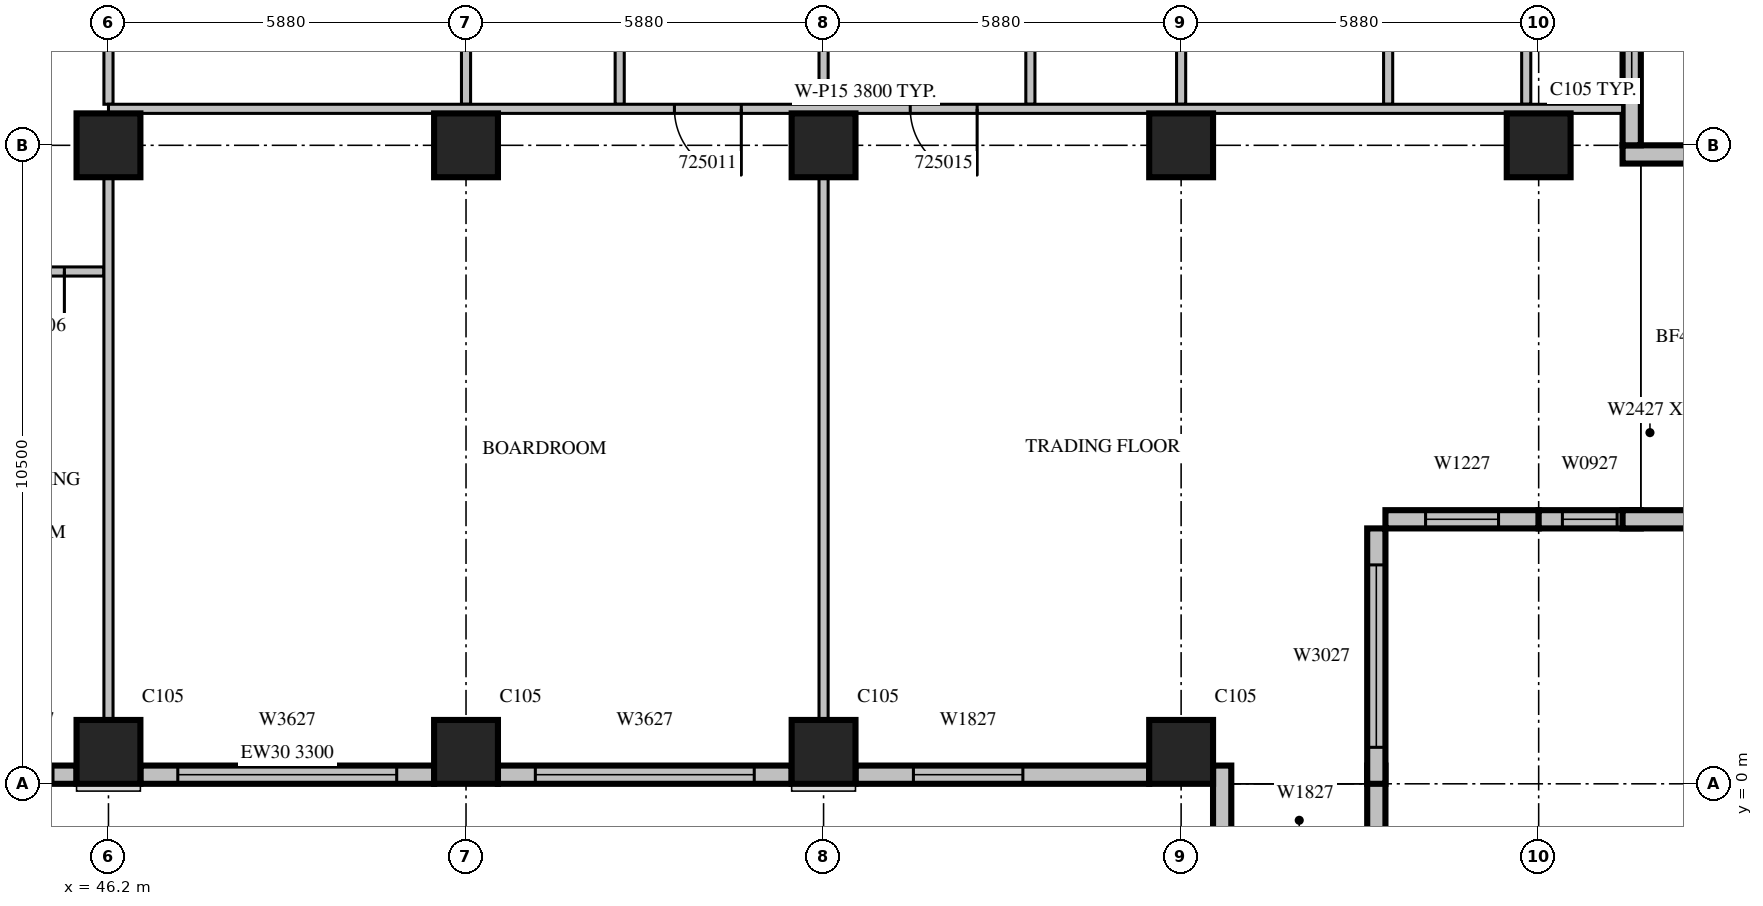
"""IFC4 building model, lengths in metres.
Left out: names, types, materials, properties, quantities, classifications, styles, units other than length and angle.
Written with IfcOpenShell. Run it as: python <this file> out.ifc"""

import sys

from ifc_helpers import new_model, si_unit, direction, frame, frame_2d, origin, origin_2d, place, context, subcontext, project, spatial, rectangle, extrude, source, transform, mapped, element, fill, save


model = new_model("IFC4")
c1 = context("Model", 3, precision=1e-05, world=origin(), true_north=direction((0.0, 1.0)))
c2 = subcontext(c1, "Body", "Model", "MODEL_VIEW")
j1 = project(units=[si_unit("LENGTHUNIT", "METRE"), si_unit("PLANEANGLEUNIT", "RADIAN")], contexts=[c1])
p1 = place(None, origin())
s1 = spatial("IfcSite", under=j1, at=p1, CompositionType="ELEMENT")
p2 = place(p1, origin())
s2 = spatial("IfcBuilding", under=s1, at=p2, CompositionType="ELEMENT")
p3 = place(p2, frame((0.0, 0.0, 116.1)))
s3 = spatial("IfcBuildingStorey", under=s2, at=p3, CompositionType="ELEMENT", Elevation=116.1)
m1 = source(origin(), c2, "Body", "SweptSolid", [
    extrude(rectangle(XDim=1.05, YDim=1.05, at=origin_2d()), origin(), (0.0, 0.0, 1.0), 4.2),
])
for number, where, z_axis, x_axis in (
    (1, (46.2, 0.525, 0.0), (0.0, 0.0, 1.0), (1.0, 0.0, 0.0)),
    (2, (52.08, 0.525, 0.0), (0.0, 0.0, 1.0), (1.0, 0.0, 0.0)),
    (3, (57.96, 0.525, 0.0), (0.0, 0.0, 1.0), (1.0, 0.0, 0.0)),
    (4, (63.84, 0.525, 0.0), (0.0, 0.0, 1.0), (1.0, 0.0, 0.0)),
    (5, (46.2, 10.5, 0.0), (0.0, 0.0, 1.0), (1.0, 0.0, 0.0)),
    (6, (52.08, 10.5, 0.0), (0.0, 0.0, 1.0), (1.0, 0.0, 0.0)),
    (7, (57.96, 10.5, 0.0), (0.0, 0.0, 1.0), (1.0, 0.0, 0.0)),
    (8, (63.84, 10.5, 0.0), (0.0, 0.0, 1.0), (1.0, 0.0, 0.0)),
    (9, (69.72, 10.5, 0.0), (0.0, 0.0, 1.0), (1.0, 0.0, 0.0)),
):
    element("IfcColumn", number, at=place(p3, frame(where, z_axis=z_axis, x_axis=x_axis)), inside=s3, PredefinedType="COLUMN", context=c2, shape_type="MappedRepresentation", body=[
        mapped(m1, transform((0.0, 0.0, 0.0), scale=1.0)),
    ])
m2 = source(origin(), c2, "Body", "SweptSolid", [
    extrude(rectangle(XDim=1.675, YDim=0.3, at=frame_2d((0.838, 0.0))), origin(), (0.0, 0.0, 1.0), 3.8),
])
p4 = place(p3, frame((44.0, 0.15, 0.0), z_axis=(0.0, 0.0, 1.0), x_axis=(1.0, 0.0, 0.0)))
e10 = element("IfcWall", 10, at=p4, inside=s3, PredefinedType="STANDARD", context=c2, shape_type="MappedRepresentation", body=[
    mapped(m2, transform((0.0, 0.0, 0.0), scale=1.0)),
])
m3 = source(origin(), c2, "Body", "SweptSolid", [
    extrude(rectangle(XDim=0.9, YDim=2.7, at=frame_2d((0.45, 1.35))), frame((0.0, 0.16, 0.0), z_axis=(0.0, -1.0, 0.0), x_axis=(1.0, 0.0, 0.0)), (0.0, 0.0, 1.0), 0.32),
])
p5 = place(p4, frame((0.388, 0.0, 0.6)))
e11 = element("IfcOpeningElement", 11, at=p5, cuts=e10, PredefinedType="OPENING", context=c2, shape_type="MappedRepresentation", body=[
    mapped(m3, transform((0.0, 0.0, 0.0), scale=1.0)),
])
m4 = source(origin(), c2, "Body", "SweptSolid", [
    extrude(rectangle(XDim=4.83, YDim=0.3, at=frame_2d((2.415, 0.0))), origin(), (0.0, 0.0, 1.0), 3.3),
])
p6 = place(p3, frame((46.725, 0.15, 0.0), z_axis=(0.0, 0.0, 1.0), x_axis=(1.0, 0.0, 0.0)))
e12 = element("IfcWall", 12, at=p6, inside=s3, PredefinedType="STANDARD", context=c2, shape_type="MappedRepresentation", body=[
    mapped(m4, transform((0.0, 0.0, 0.0), scale=1.0)),
])
m5 = source(origin(), c2, "Body", "SweptSolid", [
    extrude(rectangle(XDim=3.6, YDim=2.7, at=frame_2d((1.8, 1.35))), frame((0.0, 0.16, 0.0), z_axis=(0.0, -1.0, 0.0), x_axis=(1.0, 0.0, 0.0)), (0.0, 0.0, 1.0), 0.32),
])
p7 = place(p6, frame((0.615, 0.0, 0.6)))
e13 = element("IfcOpeningElement", 13, at=p7, cuts=e12, PredefinedType="OPENING", context=c2, shape_type="MappedRepresentation", body=[
    mapped(m5, transform((0.0, 0.0, 0.0), scale=1.0)),
])
m6 = source(origin(), c2, "Body", "SweptSolid", [
    extrude(rectangle(XDim=4.83, YDim=0.3, at=frame_2d((2.415, 0.0))), origin(), (0.0, 0.0, 1.0), 3.8),
])
p8 = place(p3, frame((52.605, 0.15, 0.0), z_axis=(0.0, 0.0, 1.0), x_axis=(1.0, 0.0, 0.0)))
e14 = element("IfcWall", 14, at=p8, inside=s3, PredefinedType="STANDARD", context=c2, shape_type="MappedRepresentation", body=[
    mapped(m6, transform((0.0, 0.0, 0.0), scale=1.0)),
])
p9 = place(p8, frame((0.615, 0.0, 0.6)))
e15 = element("IfcOpeningElement", 15, at=p9, cuts=e14, PredefinedType="OPENING", context=c2, shape_type="MappedRepresentation", body=[
    mapped(m5, transform((0.0, 0.0, 0.0), scale=1.0)),
])
p10 = place(p3, frame((58.485, 0.15, 0.0), z_axis=(0.0, 0.0, 1.0), x_axis=(1.0, 0.0, 0.0)))
e16 = element("IfcWall", 16, at=p10, inside=s3, PredefinedType="STANDARD", context=c2, shape_type="MappedRepresentation", body=[
    mapped(m6, transform((0.0, 0.0, 0.0), scale=1.0)),
])
m7 = source(origin(), c2, "Body", "SweptSolid", [
    extrude(rectangle(XDim=1.8, YDim=2.7, at=frame_2d((0.9, 1.35))), frame((0.0, 0.16, 0.0), z_axis=(0.0, -1.0, 0.0), x_axis=(1.0, 0.0, 0.0)), (0.0, 0.0, 1.0), 0.32),
])
p11 = place(p10, frame((0.953, 0.0, 0.6)))
e17 = element("IfcOpeningElement", 17, at=p11, cuts=e16, PredefinedType="OPENING", context=c2, shape_type="MappedRepresentation", body=[
    mapped(m7, transform((0.0, 0.0, 0.0), scale=1.0)),
])
m8 = source(origin(), c2, "Body", "SweptSolid", [
    extrude(rectangle(XDim=1.2, YDim=0.3, at=frame_2d((0.6, 0.0))), origin(), (0.0, 0.0, 1.0), 3.8),
])
for number, where, z_axis, x_axis in (
    (18, (64.515, 0.3, 0.0), (0.0, 0.0, 1.0), (0.0, -1.0, 0.0)),
    (19, (67.05, 0.3, 0.0), (0.0, 0.0, 1.0), (0.0, -1.0, 0.0)),
):
    element("IfcWall", number, at=place(p3, frame(where, z_axis=z_axis, x_axis=x_axis)), inside=s3, PredefinedType="STANDARD", context=c2, shape_type="MappedRepresentation", body=[
        mapped(m8, transform((0.0, 0.0, 0.0), scale=1.0)),
    ])
m9 = source(origin(), c2, "Body", "SweptSolid", [
    extrude(rectangle(XDim=4.2, YDim=0.3, at=frame_2d((2.1, 0.0))), origin(), (0.0, 0.0, 1.0), 3.8),
])
p12 = place(p3, frame((67.05, 0.0, 0.0), z_axis=(0.0, 0.0, 1.0), x_axis=(0.0, 1.0, 0.0)))
e20 = element("IfcWall", 20, at=p12, inside=s3, PredefinedType="STANDARD", context=c2, shape_type="MappedRepresentation", body=[
    mapped(m9, transform((0.0, 0.0, 0.0), scale=1.0)),
])
m10 = source(origin(), c2, "Body", "SweptSolid", [
    extrude(rectangle(XDim=3.0, YDim=2.7, at=frame_2d((1.5, 1.35))), frame((0.0, 0.16, 0.0), z_axis=(0.0, -1.0, 0.0), x_axis=(1.0, 0.0, 0.0)), (0.0, 0.0, 1.0), 0.32),
])
p13 = place(p12, frame((0.6, 0.0, 0.6)))
e21 = element("IfcOpeningElement", 21, at=p13, cuts=e20, PredefinedType="OPENING", context=c2, shape_type="MappedRepresentation", body=[
    mapped(m10, transform((0.0, 0.0, 0.0), scale=1.0)),
])
m11 = source(origin(), c2, "Body", "SweptSolid", [
    extrude(rectangle(XDim=2.52, YDim=0.3, at=frame_2d((1.26, 0.0))), origin(), (0.0, 0.0, 1.0), 3.8),
])
p14 = place(p3, frame((67.2, 4.35, 0.0), z_axis=(0.0, 0.0, 1.0), x_axis=(1.0, 0.0, 0.0)))
e22 = element("IfcWall", 22, at=p14, inside=s3, PredefinedType="STANDARD", context=c2, shape_type="MappedRepresentation", body=[
    mapped(m11, transform((0.0, 0.0, 0.0), scale=1.0)),
])
m12 = source(origin(), c2, "Body", "SweptSolid", [
    extrude(rectangle(XDim=1.2, YDim=2.7, at=frame_2d((0.6, 1.35))), frame((0.0, 0.16, 0.0), z_axis=(0.0, -1.0, 0.0), x_axis=(1.0, 0.0, 0.0)), (0.0, 0.0, 1.0), 0.32),
])
p15 = place(p14, frame((0.66, 0.0, 0.6)))
e23 = element("IfcOpeningElement", 23, at=p15, cuts=e22, PredefinedType="OPENING", context=c2, shape_type="MappedRepresentation", body=[
    mapped(m12, transform((0.0, 0.0, 0.0), scale=1.0)),
])
m13 = source(origin(), c2, "Body", "SweptSolid", [
    extrude(rectangle(XDim=1.68, YDim=0.3, at=frame_2d((0.84, 0.0))), origin(), (0.0, 0.0, 1.0), 3.8),
])
p16 = place(p3, frame((69.72, 4.35, 0.0), z_axis=(0.0, 0.0, 1.0), x_axis=(1.0, 0.0, 0.0)))
e24 = element("IfcWall", 24, at=p16, inside=s3, PredefinedType="STANDARD", context=c2, shape_type="MappedRepresentation", body=[
    mapped(m13, transform((0.0, 0.0, 0.0), scale=1.0)),
])
p17 = place(p16, frame((0.39, 0.0, 0.6)))
e25 = element("IfcOpeningElement", 25, at=p17, cuts=e24, PredefinedType="OPENING", context=c2, shape_type="MappedRepresentation", body=[
    mapped(m3, transform((0.0, 0.0, 0.0), scale=1.0)),
])
for number, where, z_axis, x_axis in (
    (26, (71.1, 4.35, 0.0), (0.0, 0.0, 1.0), (1.0, 0.0, 0.0)),
    (27, (71.1, 10.35, 0.0), (0.0, 0.0, 1.0), (1.0, 0.0, 0.0)),
):
    element("IfcWall", number, at=place(p3, frame(where, z_axis=z_axis, x_axis=x_axis)), inside=s3, PredefinedType="STANDARD", context=c2, shape_type="MappedRepresentation", body=[
        mapped(m8, transform((0.0, 0.0, 0.0), scale=1.0)),
    ])
m14 = source(origin(), c2, "Body", "SweptSolid", [
    extrude(rectangle(XDim=6.3, YDim=0.3, at=frame_2d((3.15, 0.0))), origin(), (0.0, 0.0, 1.0), 3.8),
])
p18 = place(p3, frame((71.25, 10.5, 0.0), z_axis=(0.0, 0.0, 1.0), x_axis=(0.0, 1.0, 0.0)))
e28 = element("IfcWall", 28, at=p18, inside=s3, PredefinedType="STANDARD", context=c2, shape_type="MappedRepresentation", body=[
    mapped(m14, transform((0.0, 0.0, 0.0), scale=1.0)),
])
p19 = place(p18, frame((1.025, 0.0, 0.6)))
e29 = element("IfcOpeningElement", 29, at=p19, cuts=e28, PredefinedType="OPENING", context=c2, shape_type="MappedRepresentation", body=[
    mapped(m12, transform((0.0, 0.0, 0.0), scale=1.0)),
])
m15 = source(origin(), c2, "Body", "SweptSolid", [
    extrude(rectangle(XDim=2.2, YDim=0.15, at=frame_2d((1.1, 0.0))), origin(), (0.0, 0.0, 1.0), 3.8),
])
p20 = place(p3, frame((46.125, 8.425, 0.0), z_axis=(0.0, 0.0, 1.0), x_axis=(-1.0, 0.0, 0.0)))
e30 = element("IfcWall", 30, at=p20, inside=s3, PredefinedType="PARTITIONING", context=c2, shape_type="MappedRepresentation", body=[
    mapped(m15, transform((0.0, 0.0, 0.0), scale=1.0)),
])
m16 = source(origin(), c2, "Body", "SweptSolid", [
    extrude(rectangle(XDim=0.9, YDim=2.1, at=frame_2d((0.45, 1.05))), frame((0.0, 0.085, 0.0), z_axis=(0.0, -1.0, 0.0), x_axis=(1.0, 0.0, 0.0)), (0.0, 0.0, 1.0), 0.17),
])
p21 = place(p20, frame((0.65, 0.0, 0.0)))
e31 = element("IfcOpeningElement", 31, at=p21, cuts=e30, PredefinedType="OPENING", context=c2, shape_type="MappedRepresentation", body=[
    mapped(m16, transform((0.0, 0.0, 0.0), scale=1.0)),
])
m17 = source(origin(), c2, "Body", "SweptSolid", [
    extrude(rectangle(XDim=3.825, YDim=0.15, at=frame_2d((1.913, 0.0))), origin(), (0.0, 0.0, 1.0), 3.8),
])
for number, where, z_axis, x_axis in (
    (32, (52.08, 11.175, 0.0), (0.0, 0.0, 1.0), (0.0, 1.0, 0.0)),
    (33, (54.607, 11.175, 0.0), (0.0, 0.0, 1.0), (0.0, 1.0, 0.0)),
    (34, (61.361, 11.175, 0.0), (0.0, 0.0, 1.0), (0.0, 1.0, 0.0)),
    (35, (63.84, 11.175, 0.0), (0.0, 0.0, 1.0), (0.0, 1.0, 0.0)),
    (36, (67.244, 11.175, 0.0), (0.0, 0.0, 1.0), (0.0, 1.0, 0.0)),
    (37, (69.515, 11.175, 0.0), (0.0, 0.0, 1.0), (0.0, 1.0, 0.0)),
):
    element("IfcWall", number, at=place(p3, frame(where, z_axis=z_axis, x_axis=x_axis)), inside=s3, PredefinedType="PARTITIONING", context=c2, shape_type="MappedRepresentation", body=[
        mapped(m17, transform((0.0, 0.0, 0.0), scale=1.0)),
    ])
m18 = source(origin(), c2, "Body", "SweptSolid", [
    extrude(rectangle(XDim=8.927, YDim=0.15, at=frame_2d((4.463, 0.0))), origin(), (0.0, 0.0, 1.0), 3.8),
])
p22 = place(p3, frame((46.2, 1.049, 0.0), z_axis=(0.0, 0.0, 1.0), x_axis=(0.0, 1.0, 0.0)))
e38 = element("IfcWall", 38, at=p22, inside=s3, PredefinedType="PARTITIONING", context=c2, shape_type="MappedRepresentation", body=[
    mapped(m18, transform((0.0, 0.0, 0.0), scale=1.0)),
])
p23 = place(p3, frame((46.2, 11.175, 0.0), z_axis=(0.0, 0.0, 1.0), x_axis=(0.0, 1.0, 0.0)))
e39 = element("IfcWall", 39, at=p23, inside=s3, PredefinedType="PARTITIONING", context=c2, shape_type="MappedRepresentation", body=[
    mapped(m17, transform((0.0, 0.0, 0.0), scale=1.0)),
])
p24 = place(p3, frame((57.96, 1.049, 0.0), z_axis=(0.0, 0.0, 1.0), x_axis=(0.0, 1.0, 0.0)))
e40 = element("IfcWall", 40, at=p24, inside=s3, PredefinedType="PARTITIONING", context=c2, shape_type="MappedRepresentation", body=[
    mapped(m18, transform((0.0, 0.0, 0.0), scale=1.0)),
])
p25 = place(p3, frame((57.96, 11.175, 0.0), z_axis=(0.0, 0.0, 1.0), x_axis=(0.0, 1.0, 0.0)))
e41 = element("IfcWall", 41, at=p25, inside=s3, PredefinedType="PARTITIONING", context=c2, shape_type="MappedRepresentation", body=[
    mapped(m17, transform((0.0, 0.0, 0.0), scale=1.0)),
])
m19 = source(origin(), c2, "Body", "SweptSolid", [
    extrude(rectangle(XDim=24.9, YDim=0.15, at=frame_2d((12.45, 0.0))), origin(), (0.0, 0.0, 1.0), 3.8),
])
p26 = place(p3, frame((71.1, 11.1, 0.0), z_axis=(0.0, 0.0, 1.0), x_axis=(-1.0, 0.0, 0.0)))
e42 = element("IfcWall", 42, at=p26, inside=s3, PredefinedType="PARTITIONING", context=c2, shape_type="MappedRepresentation", body=[
    mapped(m19, transform((0.0, 0.0, 0.0), scale=1.0)),
])
m20 = source(origin(), c2, "Body", "SweptSolid", [
    extrude(rectangle(XDim=1.1, YDim=2.1, at=frame_2d((0.55, 1.05))), frame((0.0, 0.085, 0.0), z_axis=(0.0, -1.0, 0.0), x_axis=(1.0, 0.0, 0.0)), (0.0, 0.0, 1.0), 0.17),
])
p27 = place(p26, frame((14.493, 0.0, 0.0)))
e43 = element("IfcOpeningElement", 43, at=p27, cuts=e42, PredefinedType="OPENING", context=c2, shape_type="MappedRepresentation", body=[
    mapped(m20, transform((0.0, 0.0, 0.0), scale=1.0)),
])
p28 = place(p26, frame((10.614, 0.0, 0.0)))
e44 = element("IfcOpeningElement", 44, at=p28, cuts=e42, PredefinedType="OPENING", context=c2, shape_type="MappedRepresentation", body=[
    mapped(m20, transform((0.0, 0.0, 0.0), scale=1.0)),
])
m21 = source(origin(), c2, "Body", "SweptSolid", [
    extrude(rectangle(XDim=0.9, YDim=2.7, at=frame_2d((0.45, 1.35))), frame((0.0, 0.03, 0.0), z_axis=(0.0, -1.0, 0.0), x_axis=(1.0, 0.0, 0.0)), (0.0, 0.0, 1.0), 0.06),
])
p29 = place(p5, origin())
e45 = element("IfcWindow", 45, at=p29, inside=s3, PartitioningType="SINGLE_PANEL", PredefinedType="WINDOW", context=c2, shape_type="MappedRepresentation", body=[
    mapped(m21, transform((0.0, 0.0, 0.0), scale=1.0)),
])
fill(e11, e45)
m22 = source(origin(), c2, "Body", "SweptSolid", [
    extrude(rectangle(XDim=3.6, YDim=2.7, at=frame_2d((1.8, 1.35))), frame((0.0, 0.03, 0.0), z_axis=(0.0, -1.0, 0.0), x_axis=(1.0, 0.0, 0.0)), (0.0, 0.0, 1.0), 0.06),
])
p30 = place(p7, origin())
e46 = element("IfcWindow", 46, at=p30, inside=s3, PartitioningType="SINGLE_PANEL", PredefinedType="WINDOW", context=c2, shape_type="MappedRepresentation", body=[
    mapped(m22, transform((0.0, 0.0, 0.0), scale=1.0)),
])
fill(e13, e46)
p31 = place(p9, origin())
e47 = element("IfcWindow", 47, at=p31, inside=s3, PartitioningType="SINGLE_PANEL", PredefinedType="WINDOW", context=c2, shape_type="MappedRepresentation", body=[
    mapped(m22, transform((0.0, 0.0, 0.0), scale=1.0)),
])
fill(e15, e47)
m23 = source(origin(), c2, "Body", "SweptSolid", [
    extrude(rectangle(XDim=1.8, YDim=2.7, at=frame_2d((0.9, 1.35))), frame((0.0, 0.03, 0.0), z_axis=(0.0, -1.0, 0.0), x_axis=(1.0, 0.0, 0.0)), (0.0, 0.0, 1.0), 0.06),
])
p32 = place(p11, origin())
e48 = element("IfcWindow", 48, at=p32, inside=s3, PartitioningType="SINGLE_PANEL", PredefinedType="WINDOW", context=c2, shape_type="MappedRepresentation", body=[
    mapped(m23, transform((0.0, 0.0, 0.0), scale=1.0)),
])
fill(e17, e48)
m24 = source(origin(), c2, "Body", "SweptSolid", [
    extrude(rectangle(XDim=3.0, YDim=2.7, at=frame_2d((1.5, 1.35))), frame((0.0, 0.03, 0.0), z_axis=(0.0, -1.0, 0.0), x_axis=(1.0, 0.0, 0.0)), (0.0, 0.0, 1.0), 0.06),
])
p33 = place(p13, origin())
e49 = element("IfcWindow", 49, at=p33, inside=s3, PartitioningType="SINGLE_PANEL", PredefinedType="WINDOW", context=c2, shape_type="MappedRepresentation", body=[
    mapped(m24, transform((0.0, 0.0, 0.0), scale=1.0)),
])
fill(e21, e49)
m25 = source(origin(), c2, "Body", "SweptSolid", [
    extrude(rectangle(XDim=1.2, YDim=2.7, at=frame_2d((0.6, 1.35))), frame((0.0, 0.03, 0.0), z_axis=(0.0, -1.0, 0.0), x_axis=(1.0, 0.0, 0.0)), (0.0, 0.0, 1.0), 0.06),
])
p34 = place(p15, origin())
e50 = element("IfcWindow", 50, at=p34, inside=s3, PartitioningType="SINGLE_PANEL", PredefinedType="WINDOW", context=c2, shape_type="MappedRepresentation", body=[
    mapped(m25, transform((0.0, 0.0, 0.0), scale=1.0)),
])
fill(e23, e50)
p35 = place(p17, origin())
e51 = element("IfcWindow", 51, at=p35, inside=s3, PartitioningType="SINGLE_PANEL", PredefinedType="WINDOW", context=c2, shape_type="MappedRepresentation", body=[
    mapped(m21, transform((0.0, 0.0, 0.0), scale=1.0)),
])
fill(e25, e51)
p36 = place(p19, origin())
e52 = element("IfcWindow", 52, at=p36, inside=s3, PartitioningType="SINGLE_PANEL", PredefinedType="WINDOW", context=c2, shape_type="MappedRepresentation", body=[
    mapped(m25, transform((0.0, 0.0, 0.0), scale=1.0)),
])
fill(e29, e52)
m26 = source(origin(), c2, "Body", "SweptSolid", [
    extrude(rectangle(XDim=0.9, YDim=2.1, at=frame_2d((0.45, 1.05))), frame((0.0, 0.025, 0.0), z_axis=(0.0, -1.0, 0.0), x_axis=(1.0, 0.0, 0.0)), (0.0, 0.0, 1.0), 0.05),
])
p37 = place(p21, origin())
e53 = element("IfcDoor", 53, at=p37, inside=s3, OperationType="SINGLE_SWING_LEFT", PredefinedType="DOOR", context=c2, shape_type="MappedRepresentation", body=[
    mapped(m26, transform((0.0, 0.0, 0.0), scale=1.0)),
])
fill(e31, e53)
m27 = source(origin(), c2, "Body", "SweptSolid", [
    extrude(rectangle(XDim=1.1, YDim=2.1, at=frame_2d((0.55, 1.05))), frame((0.0, 0.025, 0.0), z_axis=(0.0, -1.0, 0.0), x_axis=(1.0, 0.0, 0.0)), (0.0, 0.0, 1.0), 0.05),
])
p38 = place(p27, origin())
e54 = element("IfcDoor", 54, at=p38, inside=s3, OperationType="SINGLE_SWING_LEFT", PredefinedType="DOOR", context=c2, shape_type="MappedRepresentation", body=[
    mapped(m27, transform((0.0, 0.0, 0.0), scale=1.0)),
])
fill(e43, e54)
p39 = place(p28, origin())
e55 = element("IfcDoor", 55, at=p39, inside=s3, OperationType="SINGLE_SWING_LEFT", PredefinedType="DOOR", context=c2, shape_type="MappedRepresentation", body=[
    mapped(m27, transform((0.0, 0.0, 0.0), scale=1.0)),
])
fill(e44, e55)
save(model, sys.argv[1])
